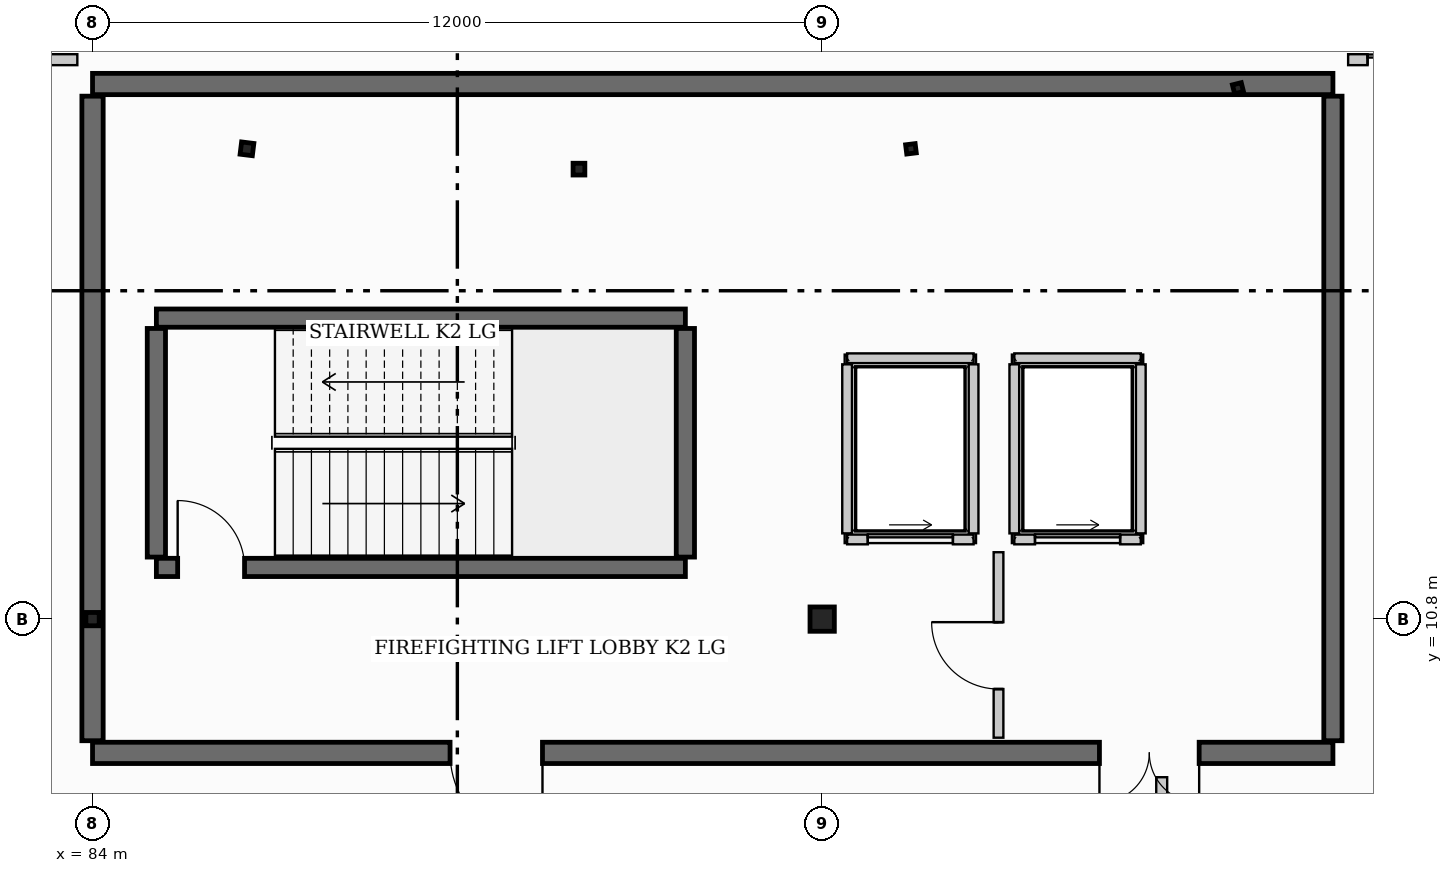
"""IFC4 building model, lengths in metres.
Left out: names, types, materials, properties, quantities, classifications, styles, units other than length and angle.
Written with IfcOpenShell. Run it as: python <this file> out.ifc"""

import sys

from ifc_helpers import new_model, si_unit, direction, frame, frame_2d, origin, origin_2d, place, context, subcontext, project, spatial, rectangle, hollow_rectangle, hollow_circle, i_section, extrude, element, fill, save


model = new_model("IFC4")
c1 = context("Model", 3, precision=1e-05, world=origin(), true_north=direction((0.0, 1.0)))
c2 = subcontext(c1, "Body", "Model", "MODEL_VIEW")
j1 = project(units=[si_unit("LENGTHUNIT", "METRE"), si_unit("PLANEANGLEUNIT", "RADIAN")], contexts=[c1])
p1 = place(None, origin())
s1 = spatial("IfcSite", under=j1, at=p1, CompositionType="ELEMENT")
p2 = place(p1, origin())
s2 = spatial("IfcBuilding", under=s1, at=p2, CompositionType="ELEMENT")
p3 = place(p2, frame((0.0, 0.0, -4.8)))
s3 = spatial("IfcBuildingStorey", under=s2, at=p3, CompositionType="ELEMENT", Elevation=-4.8)
p4 = place(p3, frame((84.0, 10.8, 0.0), z_axis=(0.0, 0.0, 1.0), x_axis=(0.0, 1.0, 0.0)))
e1 = element("IfcColumn", 1, at=p4, inside=s3, PredefinedType="COLUMN", context=c2, shape_type="SweptSolid", body=[
    extrude(hollow_circle(Radius=0.11, WallThickness=0.01, at=origin_2d()), origin(), (0.0, 0.0, 1.0), 4.8),
])
p5 = place(p3, frame((96.0, 10.8, 0.0), z_axis=(0.0, 0.0, 1.0), x_axis=(1.0, 0.0, 0.0)))
e2 = element("IfcColumn", 2, at=p5, inside=s3, PredefinedType="COLUMN", context=c2, shape_type="SweptSolid", body=[
    extrude(i_section(OverallWidth=0.4, OverallDepth=0.4, WebThickness=0.02, FlangeThickness=0.028, at=origin_2d()), origin(), (0.0, 0.0, 1.0), 4.8),
])
p6 = place(p3, frame((86.54, 18.534, 0.0), z_axis=(0.0, 0.0, 1.0), x_axis=(0.121869343405, 0.992546151641, 0.0)))
e3 = element("IfcColumn", 3, at=p6, inside=s3, PredefinedType="COLUMN", context=c2, shape_type="SweptSolid", body=[
    extrude(i_section(OverallWidth=0.203, OverallDepth=0.203, WebThickness=0.007, FlangeThickness=0.011, at=origin_2d()), origin(), (0.0, 0.0, 1.0), 4.8),
])
p7 = place(p3, frame((92.0, 18.2, 0.0), z_axis=(0.0, 0.0, 1.0), x_axis=(0.0, 1.0, 0.0)))
e4 = element("IfcColumn", 4, at=p7, inside=s3, PredefinedType="COLUMN", context=c2, shape_type="SweptSolid", body=[
    extrude(hollow_circle(Radius=0.097, WallThickness=0.008, at=origin_2d()), origin(), (0.0, 0.0, 1.0), 4.8),
])
p8 = place(p3, frame((97.46, 18.534, 0.0), z_axis=(0.0, 0.0, 1.0), x_axis=(-0.121869343405, 0.992546151641, 0.0)))
e5 = element("IfcColumn", 5, at=p8, inside=s3, PredefinedType="COLUMN", context=c2, shape_type="SweptSolid", body=[
    extrude(i_section(OverallWidth=0.153, OverallDepth=0.158, WebThickness=0.007, FlangeThickness=0.01, at=origin_2d()), origin(), (0.0, 0.0, 1.0), 4.8),
])
p9 = place(p3, frame((102.838, 19.531, 0.0), z_axis=(0.0, 0.0, 1.0), x_axis=(-0.2419218956, 0.970295726276, 0.0)))
e6 = element("IfcColumn", 6, at=p9, inside=s3, PredefinedType="COLUMN", context=c2, shape_type="SweptSolid", body=[
    extrude(hollow_rectangle(XDim=0.15, YDim=0.15, WallThickness=0.008, at=origin_2d()), origin(), (0.0, 0.0, 1.0), 4.8),
])
p10 = place(p3, frame((84.0, 19.6, 0.0), z_axis=(0.0, 0.0, 1.0), x_axis=(1.0, 0.0, 0.0)))
e7 = element("IfcWall", 7, at=p10, inside=s3, PredefinedType="SHEAR", context=c2, shape_type="SweptSolid", body=[
    extrude(rectangle(XDim=20.4, YDim=0.35, at=frame_2d((10.2, 0.0))), origin(), (0.0, 0.0, 1.0), 4.8),
])
p11 = place(p3, frame((104.4, 8.6, 0.0), z_axis=(0.0, 0.0, 1.0), x_axis=(-1.0, 0.0, 0.0)))
e8 = element("IfcWall", 8, at=p11, inside=s3, PredefinedType="SHEAR", context=c2, shape_type="SweptSolid", body=[
    extrude(rectangle(XDim=20.4, YDim=0.35, at=frame_2d((10.2, 0.0))), origin(), (0.0, 0.0, 1.0), 4.8),
])
p12 = place(p11, frame((2.2, 0.0, 0.0)))
e9 = element("IfcOpeningElement", 9, at=p12, cuts=e8, PredefinedType="OPENING", context=c2, shape_type="SweptSolid", body=[
    extrude(rectangle(XDim=1.64, YDim=2.2, at=frame_2d((0.82, 1.1))), frame((0.0, 0.185, 0.0), z_axis=(0.0, -1.0, 0.0), x_axis=(1.0, 0.0, 0.0)), (0.0, 0.0, 1.0), 0.37),
])
p13 = place(p11, frame((13.0, 0.0, 0.0)))
e10 = element("IfcOpeningElement", 10, at=p13, cuts=e8, PredefinedType="OPENING", context=c2, shape_type="SweptSolid", body=[
    extrude(rectangle(XDim=1.52, YDim=2.16, at=frame_2d((0.76, 1.08))), frame((0.0, 0.185, 0.0), z_axis=(0.0, -1.0, 0.0), x_axis=(1.0, 0.0, 0.0)), (0.0, 0.0, 1.0), 0.37),
])
p14 = place(p3, frame((84.0, 8.8, 0.0), z_axis=(0.0, 0.0, 1.0), x_axis=(0.0, 1.0, 0.0)))
e11 = element("IfcWall", 11, at=p14, inside=s3, PredefinedType="SHEAR", context=c2, shape_type="SweptSolid", body=[
    extrude(rectangle(XDim=10.6, YDim=0.35, at=frame_2d((5.3, 0.0))), origin(), (0.0, 0.0, 1.0), 4.8),
])
p15 = place(p3, frame((104.4, 19.4, 0.0), z_axis=(0.0, 0.0, 1.0), x_axis=(0.0, -1.0, 0.0)))
e12 = element("IfcWall", 12, at=p15, inside=s3, PredefinedType="SHEAR", context=c2, shape_type="SweptSolid", body=[
    extrude(rectangle(XDim=10.6, YDim=0.3, at=frame_2d((5.3, 0.0))), origin(), (0.0, 0.0, 1.0), 4.8),
])
p16 = place(p3, frame((85.05, 11.65, 0.0), z_axis=(0.0, 0.0, 1.0), x_axis=(1.0, 0.0, 0.0)))
e13 = element("IfcWall", 13, at=p16, inside=s3, PredefinedType="SHEAR", context=c2, shape_type="SweptSolid", body=[
    extrude(rectangle(XDim=8.7, YDim=0.3, at=frame_2d((4.35, 0.0))), origin(), (0.0, 0.0, 1.0), 4.8),
])
p17 = place(p16, frame((0.35, 0.0, 0.0)))
e14 = element("IfcOpeningElement", 14, at=p17, cuts=e13, PredefinedType="OPENING", context=c2, shape_type="SweptSolid", body=[
    extrude(rectangle(XDim=1.1, YDim=2.15, at=frame_2d((0.55, 1.075))), frame((0.0, 0.16, 0.0), z_axis=(0.0, -1.0, 0.0), x_axis=(1.0, 0.0, 0.0)), (0.0, 0.0, 1.0), 0.32),
])
p18 = place(p3, frame((93.75, 15.75, 0.0), z_axis=(0.0, 0.0, 1.0), x_axis=(-1.0, 0.0, 0.0)))
e15 = element("IfcWall", 15, at=p18, inside=s3, PredefinedType="SHEAR", context=c2, shape_type="SweptSolid", body=[
    extrude(rectangle(XDim=8.7, YDim=0.3, at=frame_2d((4.35, 0.0))), origin(), (0.0, 0.0, 1.0), 4.8),
])
for number, where, z_axis, x_axis in (
    (16, (85.05, 11.82, 0.0), (0.0, 0.0, 1.0), (0.0, 1.0, 0.0)),
    (17, (93.75, 11.82, 0.0), (0.0, 0.0, 1.0), (0.0, 1.0, 0.0)),
):
    element("IfcWall", number, at=place(p3, frame(where, z_axis=z_axis, x_axis=x_axis)), inside=s3, PredefinedType="SHEAR", context=c2, shape_type="SweptSolid", body=[
        extrude(rectangle(XDim=3.76, YDim=0.3, at=frame_2d((1.88, 0.0))), origin(), (0.0, 0.0, 1.0), 4.8),
    ])
p19 = place(p3, frame((96.41, 12.11, 0.0), z_axis=(0.0, 0.0, 1.0), x_axis=(1.0, 0.0, 0.0)))
e18 = element("IfcWall", 18, at=p19, inside=s3, PredefinedType="PARTITIONING", context=c2, shape_type="SweptSolid", body=[
    extrude(rectangle(XDim=2.08, YDim=0.16, at=frame_2d((1.04, 0.0))), origin(), (0.0, 0.0, 1.0), 4.43),
])
p20 = place(p19, frame((0.34, 0.0, 0.0)))
e19 = element("IfcOpeningElement", 19, at=p20, cuts=e18, PredefinedType="OPENING", context=c2, shape_type="SweptSolid", body=[
    extrude(rectangle(XDim=1.4, YDim=2.2, at=frame_2d((0.7, 1.1))), frame((0.0, 0.09, 0.0), z_axis=(0.0, -1.0, 0.0), x_axis=(1.0, 0.0, 0.0)), (0.0, 0.0, 1.0), 0.18),
])
p21 = place(p3, frame((98.49, 15.09, 0.0), z_axis=(0.0, 0.0, 1.0), x_axis=(-1.0, 0.0, 0.0)))
e20 = element("IfcWall", 20, at=p21, inside=s3, PredefinedType="PARTITIONING", context=c2, shape_type="SweptSolid", body=[
    extrude(rectangle(XDim=2.08, YDim=0.16, at=frame_2d((1.04, 0.0))), origin(), (0.0, 0.0, 1.0), 4.43),
])
for number, where, z_axis, x_axis in (
    (21, (96.41, 14.99, 0.0), (0.0, 0.0, 1.0), (0.0, -1.0, 0.0)),
    (22, (98.49, 12.21, 0.0), (0.0, 0.0, 1.0), (0.0, 1.0, 0.0)),
):
    element("IfcWall", number, at=place(p3, frame(where, z_axis=z_axis, x_axis=x_axis)), inside=s3, PredefinedType="PARTITIONING", context=c2, shape_type="SweptSolid", body=[
        extrude(rectangle(XDim=2.78, YDim=0.16, at=frame_2d((1.39, 0.0))), origin(), (0.0, 0.0, 1.0), 4.43),
    ])
p22 = place(p3, frame((99.16, 12.11, 0.0), z_axis=(0.0, 0.0, 1.0), x_axis=(1.0, 0.0, 0.0)))
e23 = element("IfcWall", 23, at=p22, inside=s3, PredefinedType="PARTITIONING", context=c2, shape_type="SweptSolid", body=[
    extrude(rectangle(XDim=2.08, YDim=0.16, at=frame_2d((1.04, 0.0))), origin(), (0.0, 0.0, 1.0), 4.43),
])
p23 = place(p22, frame((0.34, 0.0, 0.0)))
e24 = element("IfcOpeningElement", 24, at=p23, cuts=e23, PredefinedType="OPENING", context=c2, shape_type="SweptSolid", body=[
    extrude(rectangle(XDim=1.4, YDim=2.2, at=frame_2d((0.7, 1.1))), frame((0.0, 0.09, 0.0), z_axis=(0.0, -1.0, 0.0), x_axis=(1.0, 0.0, 0.0)), (0.0, 0.0, 1.0), 0.18),
])
p24 = place(p3, frame((101.24, 15.09, 0.0), z_axis=(0.0, 0.0, 1.0), x_axis=(-1.0, 0.0, 0.0)))
e25 = element("IfcWall", 25, at=p24, inside=s3, PredefinedType="PARTITIONING", context=c2, shape_type="SweptSolid", body=[
    extrude(rectangle(XDim=2.08, YDim=0.16, at=frame_2d((1.04, 0.0))), origin(), (0.0, 0.0, 1.0), 4.43),
])
for number, where, z_axis, x_axis in (
    (26, (99.16, 14.99, 0.0), (0.0, 0.0, 1.0), (0.0, -1.0, 0.0)),
    (27, (101.24, 12.21, 0.0), (0.0, 0.0, 1.0), (0.0, 1.0, 0.0)),
):
    element("IfcWall", number, at=place(p3, frame(where, z_axis=z_axis, x_axis=x_axis)), inside=s3, PredefinedType="PARTITIONING", context=c2, shape_type="SweptSolid", body=[
        extrude(rectangle(XDim=2.78, YDim=0.16, at=frame_2d((1.39, 0.0))), origin(), (0.0, 0.0, 1.0), 4.43),
    ])
p25 = place(p3, frame((98.9, 8.85, 0.0), z_axis=(0.0, 0.0, 1.0), x_axis=(0.0, 1.0, 0.0)))
e28 = element("IfcWall", 28, at=p25, inside=s3, PredefinedType="PARTITIONING", context=c2, shape_type="SweptSolid", body=[
    extrude(rectangle(XDim=3.05, YDim=0.16, at=frame_2d((1.525, 0.0))), origin(), (0.0, 0.0, 1.0), 3.961),
])
p26 = place(p25, frame((0.8, 0.0, 0.0)))
e29 = element("IfcOpeningElement", 29, at=p26, cuts=e28, PredefinedType="OPENING", context=c2, shape_type="SweptSolid", body=[
    extrude(rectangle(XDim=1.1, YDim=2.15, at=frame_2d((0.55, 1.075))), frame((0.0, 0.09, 0.0), z_axis=(0.0, -1.0, 0.0), x_axis=(1.0, 0.0, 0.0)), (0.0, 0.0, 1.0), 0.18),
])
p27 = place(p3, frame((74.942, 20.0, 0.0), z_axis=(0.0, 0.0, 1.0), x_axis=(1.0, 0.0, 0.0)))
e30 = element("IfcWall", 30, at=p27, inside=s3, PredefinedType="PARTITIONING", context=c2, shape_type="SweptSolid", body=[
    extrude(rectangle(XDim=8.808, YDim=0.18, at=frame_2d((4.404, 0.0))), origin(), (0.0, 0.0, 1.0), 3.515),
])
p28 = place(p27, frame((1.776, 0.0, 0.0)))
e31 = element("IfcOpeningElement", 31, at=p28, cuts=e30, PredefinedType="OPENING", context=c2, shape_type="SweptSolid", body=[
    extrude(rectangle(XDim=1.98, YDim=2.26, at=frame_2d((0.99, 1.13))), frame((0.0, 0.1, 0.0), z_axis=(0.0, -1.0, 0.0), x_axis=(1.0, 0.0, 0.0)), (0.0, 0.0, 1.0), 0.2),
])
p29 = place(p3, frame((101.584, 0.3, 0.0), z_axis=(0.0, 0.0, 1.0), x_axis=(0.0, 1.0, 0.0)))
e32 = element("IfcWall", 32, at=p29, inside=s3, PredefinedType="PARTITIONING", context=c2, shape_type="SweptSolid", body=[
    extrude(rectangle(XDim=7.9, YDim=0.18, at=frame_2d((3.95, 0.0))), origin(), (0.0, 0.0, 1.0), 3.961),
])
p30 = place(p3, frame((104.65, 20.0, 0.0), z_axis=(0.0, 0.0, 1.0), x_axis=(1.0, 0.0, 0.0)))
e33 = element("IfcWall", 33, at=p30, inside=s3, PredefinedType="PARTITIONING", context=c2, shape_type="SweptSolid", body=[
    extrude(rectangle(XDim=6.5, YDim=0.18, at=frame_2d((3.25, 0.0))), origin(), (0.0, 0.0, 1.0), 4.43),
])
p31 = place(p30, frame((0.32, 0.0, 0.0)))
e34 = element("IfcOpeningElement", 34, at=p31, cuts=e33, PredefinedType="OPENING", context=c2, shape_type="SweptSolid", body=[
    extrude(rectangle(XDim=1.8, YDim=2.32, at=frame_2d((0.9, 1.16))), frame((0.0, 0.1, 0.0), z_axis=(0.0, -1.0, 0.0), x_axis=(1.0, 0.0, 0.0)), (0.0, 0.0, 1.0), 0.2),
])
p32 = place(p20, origin())
e35 = element("IfcDoor", 35, at=p32, inside=s3, OperationType="SLIDING_TO_LEFT", PredefinedType="DOOR", context=c2, shape_type="SweptSolid", body=[
    extrude(rectangle(XDim=1.4, YDim=2.2, at=frame_2d((0.7, 1.1))), frame((0.0, 0.025, 0.0), z_axis=(0.0, -1.0, 0.0), x_axis=(1.0, 0.0, 0.0)), (0.0, 0.0, 1.0), 0.05),
])
fill(e19, e35)
p33 = place(p23, origin())
e36 = element("IfcDoor", 36, at=p33, inside=s3, OperationType="SLIDING_TO_LEFT", PredefinedType="DOOR", context=c2, shape_type="SweptSolid", body=[
    extrude(rectangle(XDim=1.4, YDim=2.2, at=frame_2d((0.7, 1.1))), frame((0.0, 0.025, 0.0), z_axis=(0.0, -1.0, 0.0), x_axis=(1.0, 0.0, 0.0)), (0.0, 0.0, 1.0), 0.05),
])
fill(e24, e36)
p34 = place(p17, origin())
e37 = element("IfcDoor", 37, at=p34, inside=s3, OperationType="SINGLE_SWING_LEFT", PredefinedType="DOOR", context=c2, shape_type="SweptSolid", body=[
    extrude(rectangle(XDim=1.1, YDim=2.15, at=frame_2d((0.55, 1.075))), frame((0.0, 0.025, 0.0), z_axis=(0.0, -1.0, 0.0), x_axis=(1.0, 0.0, 0.0)), (0.0, 0.0, 1.0), 0.05),
])
fill(e14, e37)
p35 = place(p12, origin())
e38 = element("IfcDoor", 38, at=p35, inside=s3, OperationType="DOUBLE_DOOR_SINGLE_SWING", PredefinedType="DOOR", context=c2, shape_type="SweptSolid", body=[
    extrude(rectangle(XDim=1.64, YDim=2.2, at=frame_2d((0.82, 1.1))), frame((0.0, 0.025, 0.0), z_axis=(0.0, -1.0, 0.0), x_axis=(1.0, 0.0, 0.0)), (0.0, 0.0, 1.0), 0.05),
])
fill(e9, e38)
p36 = place(p13, origin())
e39 = element("IfcDoor", 39, at=p36, inside=s3, OperationType="SINGLE_SWING_LEFT", PredefinedType="DOOR", context=c2, shape_type="SweptSolid", body=[
    extrude(rectangle(XDim=1.52, YDim=2.16, at=frame_2d((0.76, 1.08))), frame((0.0, 0.025, 0.0), z_axis=(0.0, -1.0, 0.0), x_axis=(1.0, 0.0, 0.0)), (0.0, 0.0, 1.0), 0.05),
])
fill(e10, e39)
p37 = place(p26, origin())
e40 = element("IfcDoor", 40, at=p37, inside=s3, OperationType="SINGLE_SWING_RIGHT", PredefinedType="DOOR", context=c2, shape_type="SweptSolid", body=[
    extrude(rectangle(XDim=1.1, YDim=2.15, at=frame_2d((0.55, 1.075))), frame((0.0, 0.025, 0.0), z_axis=(0.0, -1.0, 0.0), x_axis=(1.0, 0.0, 0.0)), (0.0, 0.0, 1.0), 0.05),
])
fill(e29, e40)
p38 = place(p31, origin())
e41 = element("IfcDoor", 41, at=p38, inside=s3, OperationType="SLIDING_TO_LEFT", PredefinedType="DOOR", context=c2, shape_type="SweptSolid", body=[
    extrude(rectangle(XDim=1.8, YDim=2.32, at=frame_2d((0.9, 1.16))), frame((0.0, 0.025, 0.0), z_axis=(0.0, -1.0, 0.0), x_axis=(1.0, 0.0, 0.0)), (0.0, 0.0, 1.0), 0.05),
])
fill(e34, e41)
save(model, sys.argv[1])
